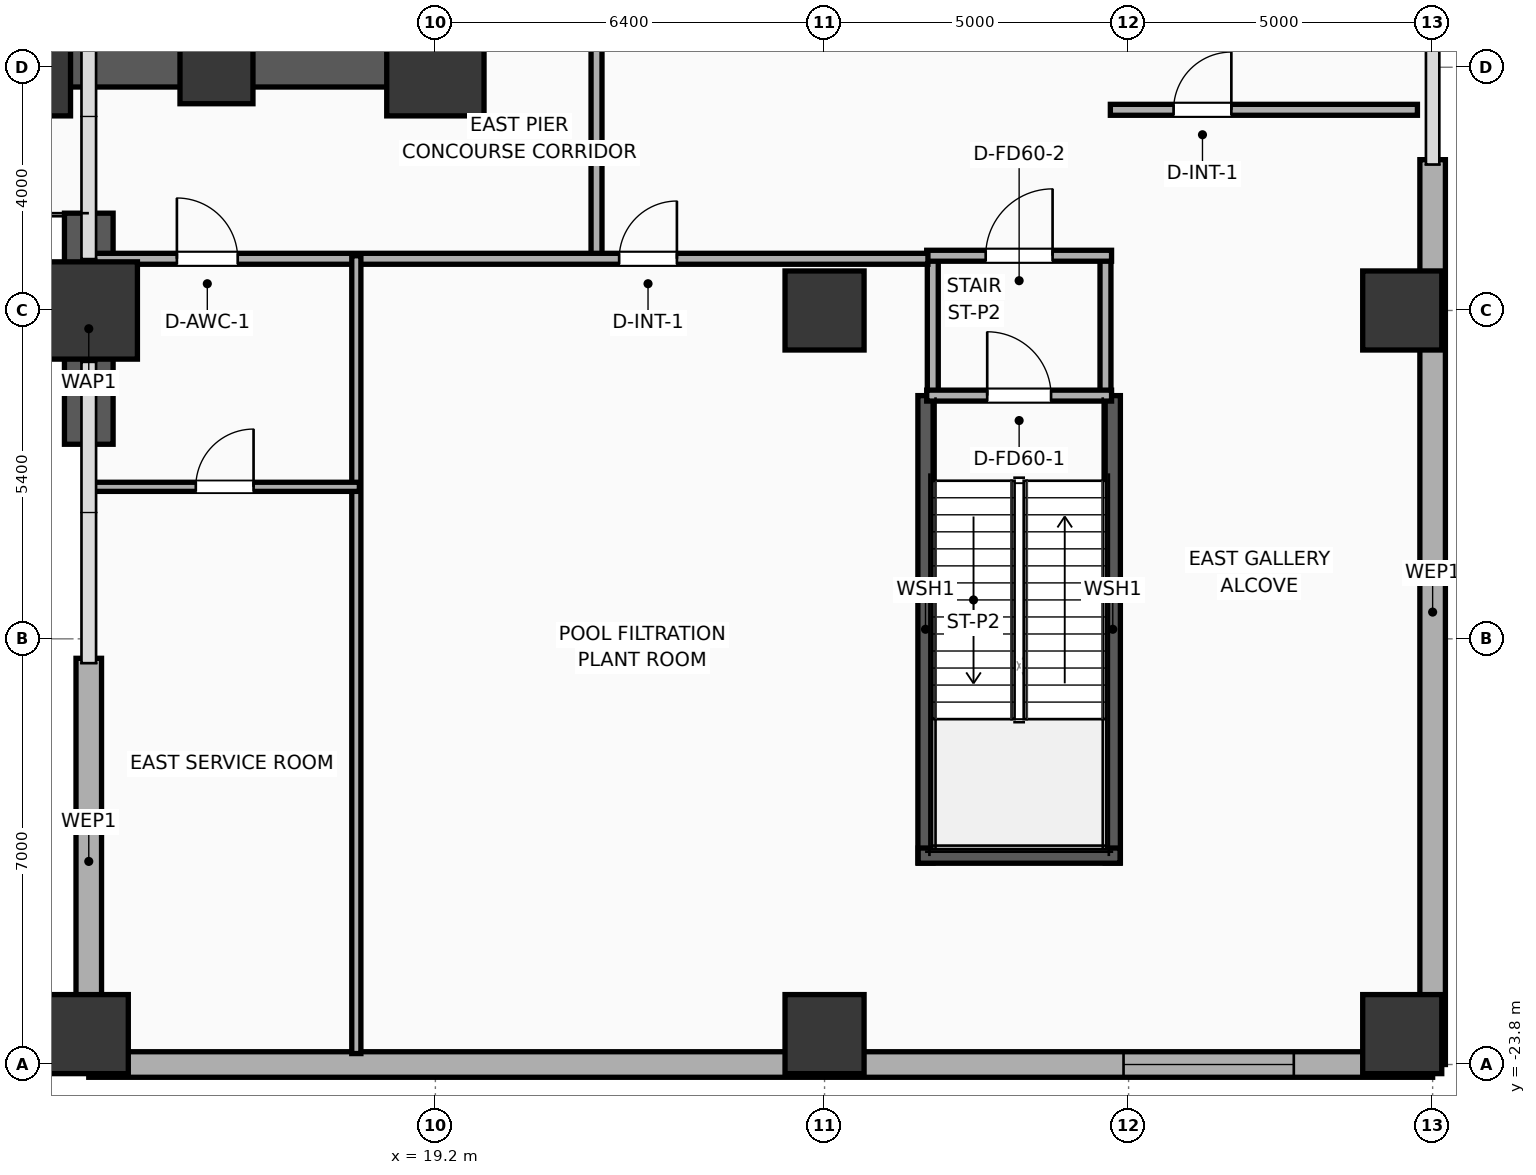
"""IFC4 building model, lengths in metres.
Left out: names, types, materials, properties, quantities, classifications, styles, units other than length and angle.
Written with IfcOpenShell. Run it as: python <this file> out.ifc"""

import sys

from ifc_helpers import new_model, si_unit, direction, frame, frame_2d, origin, origin_2d, place, context, subcontext, project, spatial, rectangle, extrude, element, fill, save


model = new_model("IFC4")
c1 = context("Model", 3, precision=1e-05, world=origin(), true_north=direction((0.0, 1.0)))
c2 = subcontext(c1, "Body", "Model", "MODEL_VIEW")
j1 = project(units=[si_unit("LENGTHUNIT", "METRE"), si_unit("PLANEANGLEUNIT", "RADIAN")], contexts=[c1])
p1 = place(None, origin())
s1 = spatial("IfcSite", under=j1, at=p1, CompositionType="ELEMENT")
p2 = place(p1, origin())
s2 = spatial("IfcBuilding", under=s1, at=p2, CompositionType="ELEMENT")
p3 = place(p2, frame((0.0, 0.0, 10.4)))
s3 = spatial("IfcBuildingStorey", under=s2, at=p3, CompositionType="ELEMENT", Elevation=10.4)
p4 = place(p3, frame((12.4, -7.4, 0.0), z_axis=(0.0, 0.0, 1.0), x_axis=(1.0, 0.0, 0.0)))
e1 = element("IfcColumn", 1, at=p4, inside=s3, PredefinedType="COLUMN", context=c2, shape_type="SweptSolid", body=[
    extrude(rectangle(XDim=1.6, YDim=1.6, at=origin_2d()), origin(), (0.0, 0.0, 1.0), 5.2),
])
p5 = place(p3, frame((15.6, -7.4, 0.0), z_axis=(0.0, 0.0, 1.0), x_axis=(1.0, 0.0, 0.0)))
e2 = element("IfcColumn", 2, at=p5, inside=s3, PredefinedType="COLUMN", context=c2, shape_type="SweptSolid", body=[
    extrude(rectangle(XDim=1.2, YDim=1.2, at=origin_2d()), origin(), (0.0, 0.0, 1.0), 5.2),
])
p6 = place(p3, frame((19.2, -7.4, 0.0), z_axis=(0.0, 0.0, 1.0), x_axis=(1.0, 0.0, 0.0)))
e3 = element("IfcColumn", 3, at=p6, inside=s3, PredefinedType="COLUMN", context=c2, shape_type="SweptSolid", body=[
    extrude(rectangle(XDim=1.6, YDim=1.6, at=origin_2d()), origin(), (0.0, 0.0, 1.0), 5.2),
])
p7 = place(p3, frame((12.075, -7.4, 0.0), z_axis=(0.0, 0.0, 1.0), x_axis=(1.0, 0.0, 0.0)))
e4 = element("IfcWall", 4, at=p7, inside=s3, PredefinedType="SHEAR", context=c2, shape_type="SweptSolid", body=[
    extrude(rectangle(XDim=7.45, YDim=0.65, at=frame_2d((3.725, 0.0))), origin(), (0.0, 0.0, 1.0), 4.92),
])
p8 = place(p3, frame((19.145, -7.4, 0.0), z_axis=(0.0, 0.0, 1.0), x_axis=(0.0, 1.0, 0.0)))
e5 = element("IfcWall", 5, at=p8, inside=s3, PredefinedType="SHEAR", context=c2, shape_type="SweptSolid", body=[
    extrude(rectangle(XDim=14.8, YDim=0.65, at=frame_2d((7.4, 0.0))), origin(), (0.0, 0.0, 1.0), 4.92),
])
for number, where, z_axis, x_axis in (
    (6, (27.26, -20.485, 0.0), (0.0, 0.0, 1.0), (0.0, 1.0, 0.0)),
    (7, (30.34, -20.485, 0.0), (0.0, 0.0, 1.0), (0.0, 1.0, 0.0)),
):
    element("IfcWall", number, at=place(p3, frame(where, z_axis=z_axis, x_axis=x_axis)), inside=s3, PredefinedType="SOLIDWALL", context=c2, shape_type="SweptSolid", body=[
        extrude(rectangle(XDim=7.685, YDim=0.25, at=frame_2d((3.843, 0.0))), origin(), (0.0, 0.0, 1.0), 4.92),
    ])
p9 = place(p3, frame((27.14, -20.365, 0.0), z_axis=(0.0, 0.0, 1.0), x_axis=(1.0, 0.0, 0.0)))
e8 = element("IfcWall", 8, at=p9, inside=s3, PredefinedType="SOLIDWALL", context=c2, shape_type="SweptSolid", body=[
    extrude(rectangle(XDim=3.32, YDim=0.25, at=frame_2d((1.66, 0.0))), origin(), (0.0, 0.0, 1.0), 4.92),
])
p10 = place(p3, frame((13.5, -23.3, 0.0), z_axis=(0.0, 0.0, 1.0), x_axis=(1.0, 0.0, 0.0)))
e9 = element("IfcColumn", 9, at=p10, inside=s3, PredefinedType="COLUMN", context=c2, shape_type="SweptSolid", body=[
    extrude(rectangle(XDim=1.3, YDim=1.3, at=origin_2d()), origin(), (0.0, 0.0, 1.0), 5.2),
])
p11 = place(p3, frame((13.5, -11.4, 0.0), z_axis=(0.0, 0.0, 1.0), x_axis=(1.0, 0.0, 0.0)))
e10 = element("IfcColumn", 10, at=p11, inside=s3, PredefinedType="COLUMN", context=c2, shape_type="SweptSolid", body=[
    extrude(rectangle(XDim=1.6, YDim=1.6, at=origin_2d()), origin(), (0.0, 0.0, 1.0), 5.2),
])
for number, where, z_axis, x_axis in (
    (11, (25.6, -23.3, 0.0), (0.0, 0.0, 1.0), (1.0, 0.0, 0.0)),
    (12, (25.6, -11.4, 0.0), (0.0, 0.0, 1.0), (1.0, 0.0, 0.0)),
    (13, (35.1, -23.3, 0.0), (0.0, 0.0, 1.0), (1.0, 0.0, 0.0)),
    (14, (35.1, -11.4, 0.0), (0.0, 0.0, 1.0), (1.0, 0.0, 0.0)),
):
    element("IfcColumn", number, at=place(p3, frame(where, z_axis=z_axis, x_axis=x_axis)), inside=s3, PredefinedType="COLUMN", context=c2, shape_type="SweptSolid", body=[
        extrude(rectangle(XDim=1.3, YDim=1.3, at=origin_2d()), origin(), (0.0, 0.0, 1.0), 5.2),
    ])
p12 = place(p3, frame((13.5, -13.6, 0.0), z_axis=(0.0, 0.0, 1.0), x_axis=(0.0, 1.0, 0.0)))
e15 = element("IfcWall", 15, at=p12, inside=s3, PredefinedType="SOLIDWALL", context=c2, shape_type="SweptSolid", body=[
    extrude(rectangle(XDim=3.8, YDim=0.8, at=frame_2d((1.9, 0.0))), origin(), (0.0, 0.0, 1.0), 4.92),
])
p13 = place(p3, frame((13.5, -23.8, 0.0), z_axis=(0.0, 0.0, 1.0), x_axis=(1.0, 0.0, 0.0)))
e16 = element("IfcWall", 16, at=p13, inside=s3, PredefinedType="ELEMENTEDWALL", context=c2, shape_type="SweptSolid", body=[
    extrude(rectangle(XDim=22.1, YDim=0.42, at=frame_2d((11.05, 0.0))), origin(), (0.0, 0.0, 1.0), 4.92),
])
p14 = place(p13, frame((17.017, 0.0, 0.65)))
e17 = element("IfcOpeningElement", 17, at=p14, cuts=e16, PredefinedType="OPENING", context=c2, shape_type="SweptSolid", body=[
    extrude(rectangle(XDim=2.8, YDim=2.6, at=frame_2d((1.4, 1.3))), frame((0.0, 0.22, 0.0), z_axis=(0.0, -1.0, 0.0), x_axis=(1.0, 0.0, 0.0)), (0.0, 0.0, 1.0), 0.44),
])
p15 = place(p3, frame((35.6, -23.8, 0.0), z_axis=(0.0, 0.0, 1.0), x_axis=(0.0, 1.0, 0.0)))
e18 = element("IfcWall", 18, at=p15, inside=s3, PredefinedType="ELEMENTEDWALL", context=c2, shape_type="SweptSolid", body=[
    extrude(rectangle(XDim=14.88, YDim=0.42, at=frame_2d((7.44, 0.0))), origin(), (0.0, 0.0, 1.0), 4.92),
])
p16 = place(p3, frame((13.5, -23.8, 0.0), z_axis=(0.0, 0.0, 1.0), x_axis=(0.0, 1.0, 0.0)))
e19 = element("IfcWall", 19, at=p16, inside=s3, PredefinedType="ELEMENTEDWALL", context=c2, shape_type="SweptSolid", body=[
    extrude(rectangle(XDim=6.68, YDim=0.42, at=frame_2d((3.34, 0.0))), origin(), (0.0, 0.0, 1.0), 4.21),
])
p17 = place(p3, frame((15.4, -7.4, 0.0), z_axis=(0.0, 0.0, 1.0), x_axis=(0.0, 1.0, 0.0)))
e20 = element("IfcWall", 20, at=p17, inside=s3, PredefinedType="SOLIDWALL", context=c2, shape_type="SweptSolid", body=[
    extrude(rectangle(XDim=2.6, YDim=0.25, at=frame_2d((1.3, 0.0))), origin(), (0.0, 0.0, 1.0), 4.92),
])
for number, where, z_axis, x_axis in (
    (21, (27.38, -12.8, 0.0), (0.0, 0.0, 1.0), (0.0, 1.0, 0.0)),
    (22, (30.22, -12.8, 0.0), (0.0, 0.0, 1.0), (0.0, 1.0, 0.0)),
):
    element("IfcWall", number, at=place(p3, frame(where, z_axis=z_axis, x_axis=x_axis)), inside=s3, PredefinedType="PARTITIONING", context=c2, shape_type="SweptSolid", body=[
        extrude(rectangle(XDim=2.35, YDim=0.18, at=frame_2d((1.175, 0.0))), origin(), (0.0, 0.0, 1.0), 4.92),
    ])
p18 = place(p3, frame((27.28, -12.8, 0.0), z_axis=(0.0, 0.0, 1.0), x_axis=(1.0, 0.0, 0.0)))
e23 = element("IfcWall", 23, at=p18, inside=s3, PredefinedType="PARTITIONING", context=c2, shape_type="SweptSolid", body=[
    extrude(rectangle(XDim=3.04, YDim=0.18, at=frame_2d((1.52, 0.0))), origin(), (0.0, 0.0, 1.0), 4.92),
])
p19 = place(p18, frame((0.995, 0.0, 0.0)))
e24 = element("IfcOpeningElement", 24, at=p19, cuts=e23, PredefinedType="OPENING", context=c2, shape_type="SweptSolid", body=[
    extrude(rectangle(XDim=1.05, YDim=2.05, at=frame_2d((0.525, 1.025))), frame((0.0, 0.1, 0.0), z_axis=(0.0, -1.0, 0.0), x_axis=(1.0, 0.0, 0.0)), (0.0, 0.0, 1.0), 0.2),
])
p20 = place(p3, frame((27.28, -10.5, 0.0), z_axis=(0.0, 0.0, 1.0), x_axis=(1.0, 0.0, 0.0)))
e25 = element("IfcWall", 25, at=p20, inside=s3, PredefinedType="PARTITIONING", context=c2, shape_type="SweptSolid", body=[
    extrude(rectangle(XDim=3.04, YDim=0.18, at=frame_2d((1.52, 0.0))), origin(), (0.0, 0.0, 1.0), 4.92),
])
p21 = place(p20, frame((0.97, 0.0, 0.0)))
e26 = element("IfcOpeningElement", 26, at=p21, cuts=e25, PredefinedType="OPENING", context=c2, shape_type="SweptSolid", body=[
    extrude(rectangle(XDim=1.1, YDim=2.05, at=frame_2d((0.55, 1.025))), frame((0.0, 0.1, 0.0), z_axis=(0.0, -1.0, 0.0), x_axis=(1.0, 0.0, 0.0)), (0.0, 0.0, 1.0), 0.2),
])
p22 = place(p3, frame((21.85, -10.5, 0.0), z_axis=(0.0, 0.0, 1.0), x_axis=(0.0, 1.0, 0.0)))
e27 = element("IfcWall", 27, at=p22, inside=s3, PredefinedType="PARTITIONING", context=c2, shape_type="SweptSolid", body=[
    extrude(rectangle(XDim=34.12, YDim=0.18, at=frame_2d((17.06, 0.0))), origin(), (0.0, 0.0, 1.0), 4.92),
])
p23 = place(p22, frame((13.531, 0.0, 0.0)))
e28 = element("IfcOpeningElement", 28, at=p23, cuts=e27, PredefinedType="OPENING", context=c2, shape_type="SweptSolid", body=[
    extrude(rectangle(XDim=1.6, YDim=2.05, at=frame_2d((0.8, 1.025))), frame((0.0, 0.1, 0.0), z_axis=(0.0, -1.0, 0.0), x_axis=(1.0, 0.0, 0.0)), (0.0, 0.0, 1.0), 0.2),
])
p24 = place(p3, frame((30.3, -8.1, 0.0), z_axis=(0.0, 0.0, 1.0), x_axis=(1.0, 0.0, 0.0)))
e29 = element("IfcWall", 29, at=p24, inside=s3, PredefinedType="PARTITIONING", context=c2, shape_type="SweptSolid", body=[
    extrude(rectangle(XDim=5.05, YDim=0.18, at=frame_2d((2.525, 0.0))), origin(), (0.0, 0.0, 1.0), 4.92),
])
p25 = place(p24, frame((1.04, 0.0, 0.0)))
e30 = element("IfcOpeningElement", 30, at=p25, cuts=e29, PredefinedType="OPENING", context=c2, shape_type="SweptSolid", body=[
    extrude(rectangle(XDim=0.95, YDim=2.05, at=frame_2d((0.475, 1.025))), frame((0.0, 0.1, 0.0), z_axis=(0.0, -1.0, 0.0), x_axis=(1.0, 0.0, 0.0)), (0.0, 0.0, 1.0), 0.2),
])
p26 = place(p3, frame((13.52, -10.55, 0.0), z_axis=(0.0, 0.0, 1.0), x_axis=(1.0, 0.0, 0.0)))
e31 = element("IfcWall", 31, at=p26, inside=s3, PredefinedType="PARTITIONING", context=c2, shape_type="SweptSolid", body=[
    extrude(rectangle(XDim=13.78, YDim=0.18, at=frame_2d((6.89, 0.0))), origin(), (0.0, 0.0, 1.0), 4.92),
])
p27 = place(p26, frame((1.429, 0.0, 0.0)))
e32 = element("IfcOpeningElement", 32, at=p27, cuts=e31, PredefinedType="OPENING", context=c2, shape_type="SweptSolid", body=[
    extrude(rectangle(XDim=1.0, YDim=2.05, at=frame_2d((0.5, 1.025))), frame((0.0, 0.1, 0.0), z_axis=(0.0, -1.0, 0.0), x_axis=(1.0, 0.0, 0.0)), (0.0, 0.0, 1.0), 0.2),
])
p28 = place(p26, frame((8.702, 0.0, 0.0)))
e33 = element("IfcOpeningElement", 33, at=p28, cuts=e31, PredefinedType="OPENING", context=c2, shape_type="SweptSolid", body=[
    extrude(rectangle(XDim=0.95, YDim=2.05, at=frame_2d((0.475, 1.025))), frame((0.0, 0.1, 0.0), z_axis=(0.0, -1.0, 0.0), x_axis=(1.0, 0.0, 0.0)), (0.0, 0.0, 1.0), 0.2),
])
p29 = place(p3, frame((17.9, -23.62, 0.0), z_axis=(0.0, 0.0, 1.0), x_axis=(0.0, 1.0, 0.0)))
e34 = element("IfcWall", 34, at=p29, inside=s3, PredefinedType="PLUMBINGWALL", context=c2, shape_type="SweptSolid", body=[
    extrude(rectangle(XDim=13.12, YDim=0.15, at=frame_2d((6.56, 0.0))), origin(), (0.0, 0.0, 1.0), 4.92),
])
p30 = place(p3, frame((13.52, -14.3, 0.0), z_axis=(0.0, 0.0, 1.0), x_axis=(1.0, 0.0, 0.0)))
e35 = element("IfcWall", 35, at=p30, inside=s3, PredefinedType="PLUMBINGWALL", context=c2, shape_type="SweptSolid", body=[
    extrude(rectangle(XDim=4.43, YDim=0.15, at=frame_2d((2.215, 0.0))), origin(), (0.0, 0.0, 1.0), 4.92),
])
p31 = place(p30, frame((1.74, 0.0, 0.0)))
e36 = element("IfcOpeningElement", 36, at=p31, cuts=e35, PredefinedType="OPENING", context=c2, shape_type="SweptSolid", body=[
    extrude(rectangle(XDim=0.95, YDim=2.05, at=frame_2d((0.475, 1.025))), frame((0.0, 0.085, 0.0), z_axis=(0.0, -1.0, 0.0), x_axis=(1.0, 0.0, 0.0)), (0.0, 0.0, 1.0), 0.17),
])
p32 = place(p14, origin())
e37 = element("IfcWindow", 37, at=p32, inside=s3, PartitioningType="SINGLE_PANEL", PredefinedType="WINDOW", context=c2, shape_type="SweptSolid", body=[
    extrude(rectangle(XDim=2.8, YDim=2.6, at=frame_2d((1.4, 1.3))), frame((0.0, 0.03, 0.0), z_axis=(0.0, -1.0, 0.0), x_axis=(1.0, 0.0, 0.0)), (0.0, 0.0, 1.0), 0.06),
])
fill(e17, e37)
p33 = place(p19, origin())
e38 = element("IfcDoor", 38, at=p33, inside=s3, OperationType="SINGLE_SWING_LEFT", PredefinedType="DOOR", context=c2, shape_type="SweptSolid", body=[
    extrude(rectangle(XDim=1.05, YDim=2.05, at=frame_2d((0.525, 1.025))), frame((0.0, 0.025, 0.0), z_axis=(0.0, -1.0, 0.0), x_axis=(1.0, 0.0, 0.0)), (0.0, 0.0, 1.0), 0.05),
])
fill(e24, e38)
p34 = place(p21, origin())
e39 = element("IfcDoor", 39, at=p34, inside=s3, OperationType="SINGLE_SWING_RIGHT", PredefinedType="DOOR", context=c2, shape_type="SweptSolid", body=[
    extrude(rectangle(XDim=1.1, YDim=2.05, at=frame_2d((0.55, 1.025))), frame((0.0, 0.025, 0.0), z_axis=(0.0, -1.0, 0.0), x_axis=(1.0, 0.0, 0.0)), (0.0, 0.0, 1.0), 0.05),
])
fill(e26, e39)
p35 = place(p25, origin())
e40 = element("IfcDoor", 40, at=p35, inside=s3, OperationType="SINGLE_SWING_RIGHT", PredefinedType="DOOR", context=c2, shape_type="SweptSolid", body=[
    extrude(rectangle(XDim=0.95, YDim=2.05, at=frame_2d((0.475, 1.025))), frame((0.0, 0.025, 0.0), z_axis=(0.0, -1.0, 0.0), x_axis=(1.0, 0.0, 0.0)), (0.0, 0.0, 1.0), 0.05),
])
fill(e30, e40)
p36 = place(p27, origin())
e41 = element("IfcDoor", 41, at=p36, inside=s3, OperationType="SINGLE_SWING_LEFT", PredefinedType="DOOR", context=c2, shape_type="SweptSolid", body=[
    extrude(rectangle(XDim=1.0, YDim=2.05, at=frame_2d((0.5, 1.025))), frame((0.0, 0.025, 0.0), z_axis=(0.0, -1.0, 0.0), x_axis=(1.0, 0.0, 0.0)), (0.0, 0.0, 1.0), 0.05),
])
fill(e32, e41)
p37 = place(p28, origin())
e42 = element("IfcDoor", 42, at=p37, inside=s3, OperationType="SINGLE_SWING_RIGHT", PredefinedType="DOOR", context=c2, shape_type="SweptSolid", body=[
    extrude(rectangle(XDim=0.95, YDim=2.05, at=frame_2d((0.475, 1.025))), frame((0.0, 0.025, 0.0), z_axis=(0.0, -1.0, 0.0), x_axis=(1.0, 0.0, 0.0)), (0.0, 0.0, 1.0), 0.05),
])
fill(e33, e42)
p38 = place(p31, origin())
e43 = element("IfcDoor", 43, at=p38, inside=s3, OperationType="SINGLE_SWING_RIGHT", PredefinedType="DOOR", context=c2, shape_type="SweptSolid", body=[
    extrude(rectangle(XDim=0.95, YDim=2.05, at=frame_2d((0.475, 1.025))), frame((0.0, 0.025, 0.0), z_axis=(0.0, -1.0, 0.0), x_axis=(1.0, 0.0, 0.0)), (0.0, 0.0, 1.0), 0.05),
])
fill(e36, e43)
save(model, sys.argv[1])
